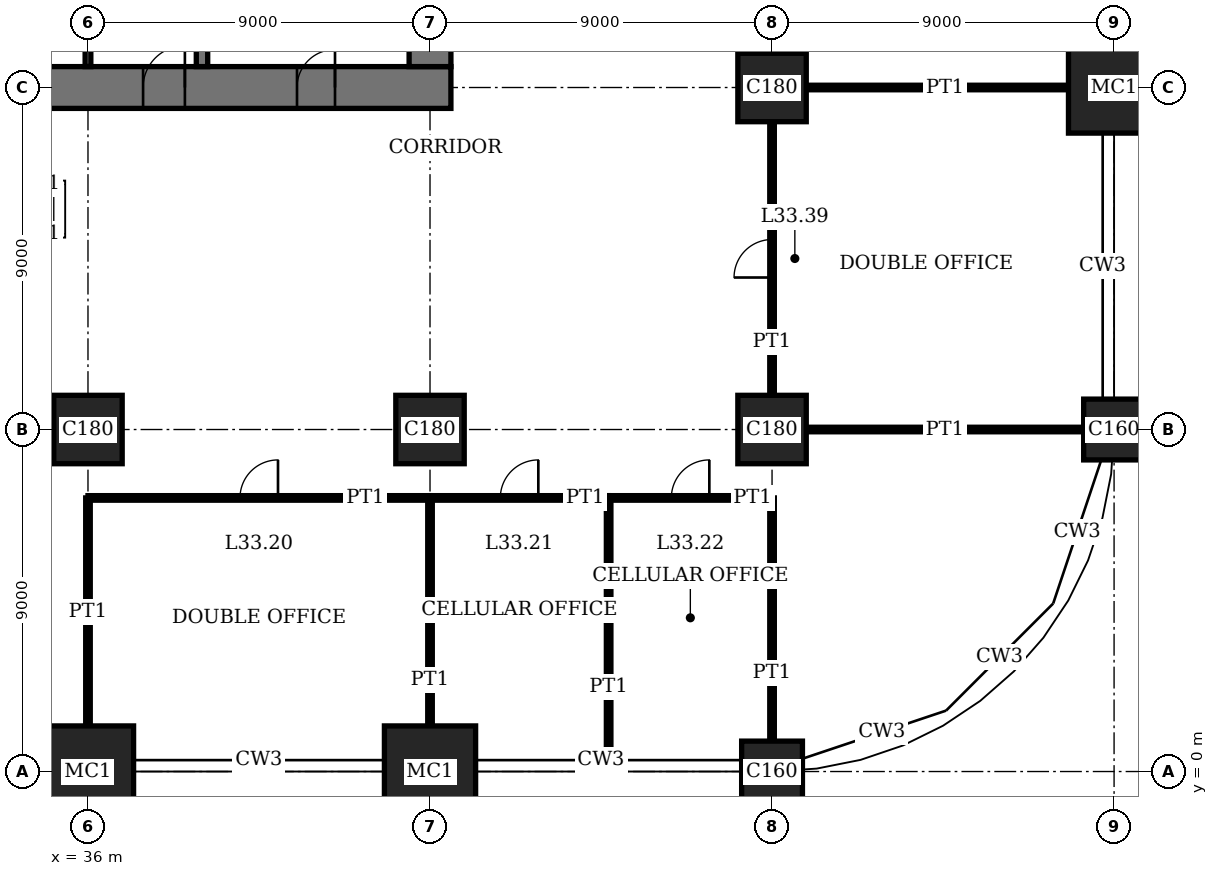
"""IFC4 building model, lengths in metres.
Left out: names, types, materials, properties, quantities, classifications, styles, units other than length and angle.
Written with IfcOpenShell. Run it as: python <this file> out.ifc"""

import sys

from ifc_helpers import new_model, si_unit, direction, frame, frame_2d, origin, origin_2d, place, context, subcontext, project, spatial, rectangle, extrude, element, fill, save


model = new_model("IFC4")
c1 = context("Model", 3, precision=1e-05, world=origin(), true_north=direction((0.0, 1.0)))
c2 = subcontext(c1, "Body", "Model", "MODEL_VIEW")
j1 = project(units=[si_unit("LENGTHUNIT", "METRE"), si_unit("PLANEANGLEUNIT", "RADIAN")], contexts=[c1])
p1 = place(None, origin())
s1 = spatial("IfcSite", under=j1, at=p1, CompositionType="ELEMENT")
p2 = place(p1, origin())
s2 = spatial("IfcBuilding", under=s1, at=p2, CompositionType="ELEMENT")
p3 = place(p2, frame((0.0, 0.0, 137.0)))
s3 = spatial("IfcBuildingStorey", under=s2, at=p3, CompositionType="ELEMENT", Elevation=137.0)
p4 = place(p3, frame((36.0, 0.0, 0.0), z_axis=(0.0, 0.0, 1.0), x_axis=(1.0, 0.0, 0.0)))
e1 = element("IfcColumn", 1, at=p4, inside=s3, PredefinedType="COLUMN", context=c2, shape_type="SweptSolid", body=[
    extrude(rectangle(XDim=2.4, YDim=2.4, at=origin_2d()), origin(), (0.0, 0.0, 1.0), 4.0),
])
p5 = place(p3, frame((36.0, 9.0, 0.0), z_axis=(0.0, 0.0, 1.0), x_axis=(1.0, 0.0, 0.0)))
e2 = element("IfcColumn", 2, at=p5, inside=s3, PredefinedType="COLUMN", context=c2, shape_type="SweptSolid", body=[
    extrude(rectangle(XDim=1.8, YDim=1.8, at=origin_2d()), origin(), (0.0, 0.0, 1.0), 4.0),
])
p6 = place(p3, frame((45.0, 0.0, 0.0), z_axis=(0.0, 0.0, 1.0), x_axis=(1.0, 0.0, 0.0)))
e3 = element("IfcColumn", 3, at=p6, inside=s3, PredefinedType="COLUMN", context=c2, shape_type="SweptSolid", body=[
    extrude(rectangle(XDim=2.4, YDim=2.4, at=origin_2d()), origin(), (0.0, 0.0, 1.0), 4.0),
])
p7 = place(p3, frame((45.0, 9.0, 0.0), z_axis=(0.0, 0.0, 1.0), x_axis=(1.0, 0.0, 0.0)))
e4 = element("IfcColumn", 4, at=p7, inside=s3, PredefinedType="COLUMN", context=c2, shape_type="SweptSolid", body=[
    extrude(rectangle(XDim=1.8, YDim=1.8, at=origin_2d()), origin(), (0.0, 0.0, 1.0), 4.0),
])
p8 = place(p3, frame((54.0, 0.0, 0.0), z_axis=(0.0, 0.0, 1.0), x_axis=(1.0, 0.0, 0.0)))
e5 = element("IfcColumn", 5, at=p8, inside=s3, PredefinedType="COLUMN", context=c2, shape_type="SweptSolid", body=[
    extrude(rectangle(XDim=1.6, YDim=1.6, at=origin_2d()), origin(), (0.0, 0.0, 1.0), 4.0),
])
for number, where, z_axis, x_axis in (
    (6, (54.0, 9.0, 0.0), (0.0, 0.0, 1.0), (1.0, 0.0, 0.0)),
    (7, (54.0, 18.0, 0.0), (0.0, 0.0, 1.0), (1.0, 0.0, 0.0)),
):
    element("IfcColumn", number, at=place(p3, frame(where, z_axis=z_axis, x_axis=x_axis)), inside=s3, PredefinedType="COLUMN", context=c2, shape_type="SweptSolid", body=[
        extrude(rectangle(XDim=1.8, YDim=1.8, at=origin_2d()), origin(), (0.0, 0.0, 1.0), 4.0),
    ])
p9 = place(p3, frame((63.0, 9.0, 0.0), z_axis=(0.0, 0.0, 1.0), x_axis=(1.0, 0.0, 0.0)))
e8 = element("IfcColumn", 8, at=p9, inside=s3, PredefinedType="COLUMN", context=c2, shape_type="SweptSolid", body=[
    extrude(rectangle(XDim=1.6, YDim=1.6, at=origin_2d()), origin(), (0.0, 0.0, 1.0), 4.0),
])
p10 = place(p3, frame((63.0, 18.0, 0.0), z_axis=(0.0, 0.0, 1.0), x_axis=(1.0, 0.0, 0.0)))
e9 = element("IfcColumn", 9, at=p10, inside=s3, PredefinedType="COLUMN", context=c2, shape_type="SweptSolid", body=[
    extrude(rectangle(XDim=2.4, YDim=2.4, at=origin_2d()), origin(), (0.0, 0.0, 1.0), 4.0),
])
p11 = place(p3, frame((17.45, 18.0, 0.0), z_axis=(0.0, 0.0, 1.0), x_axis=(1.0, 0.0, 0.0)))
e10 = element("IfcWall", 10, at=p11, inside=s3, PredefinedType="SHEAR", context=c2, shape_type="SweptSolid", body=[
    extrude(rectangle(XDim=28.1, YDim=1.1, at=frame_2d((14.05, 0.0))), origin(), (0.0, 0.0, 1.0), 4.0),
])
p12 = place(p11, frame((11.55, 0.0, 0.0)))
e11 = element("IfcOpeningElement", 11, at=p12, cuts=e10, PredefinedType="OPENING", context=c2, shape_type="SweptSolid", body=[
    extrude(rectangle(XDim=1.0, YDim=2.4, at=frame_2d((0.5, 1.2))), frame((0.0, 0.56, 0.0), z_axis=(0.0, -1.0, 0.0), x_axis=(1.0, 0.0, 0.0)), (0.0, 0.0, 1.0), 1.12),
])
p13 = place(p11, frame((16.55, 0.0, 0.0)))
e12 = element("IfcOpeningElement", 12, at=p13, cuts=e10, PredefinedType="OPENING", context=c2, shape_type="SweptSolid", body=[
    extrude(rectangle(XDim=1.0, YDim=2.4, at=frame_2d((0.5, 1.2))), frame((0.0, 0.56, 0.0), z_axis=(0.0, -1.0, 0.0), x_axis=(1.0, 0.0, 0.0)), (0.0, 0.0, 1.0), 1.12),
])
p14 = place(p11, frame((20.0, 0.0, 0.0)))
e13 = element("IfcOpeningElement", 13, at=p14, cuts=e10, PredefinedType="OPENING", context=c2, shape_type="SweptSolid", body=[
    extrude(rectangle(XDim=1.1, YDim=2.4, at=frame_2d((0.55, 1.2))), frame((0.0, 0.56, 0.0), z_axis=(0.0, -1.0, 0.0), x_axis=(1.0, 0.0, 0.0)), (0.0, 0.0, 1.0), 1.12),
])
p15 = place(p11, frame((24.05, 0.0, 0.0)))
e14 = element("IfcOpeningElement", 14, at=p15, cuts=e10, PredefinedType="OPENING", context=c2, shape_type="SweptSolid", body=[
    extrude(rectangle(XDim=1.0, YDim=2.4, at=frame_2d((0.5, 1.2))), frame((0.0, 0.56, 0.0), z_axis=(0.0, -1.0, 0.0), x_axis=(1.0, 0.0, 0.0)), (0.0, 0.0, 1.0), 1.12),
])
p16 = place(p3, frame((45.0, 18.55, 0.0), z_axis=(0.0, 0.0, 1.0), x_axis=(0.0, 1.0, 0.0)))
e15 = element("IfcWall", 15, at=p16, inside=s3, PredefinedType="SHEAR", context=c2, shape_type="SweptSolid", body=[
    extrude(rectangle(XDim=16.9, YDim=1.1, at=frame_2d((8.45, 0.0))), origin(), (0.0, 0.0, 1.0), 4.0),
])
p17 = place(p16, frame((8.45, 0.0, 0.0)))
e16 = element("IfcOpeningElement", 16, at=p17, cuts=e15, PredefinedType="OPENING", context=c2, shape_type="SweptSolid", body=[
    extrude(rectangle(XDim=1.8, YDim=2.4, at=frame_2d((0.9, 1.2))), frame((0.0, 0.56, 0.0), z_axis=(0.0, -1.0, 0.0), x_axis=(1.0, 0.0, 0.0)), (0.0, 0.0, 1.0), 1.12),
])
p18 = place(p3, frame((39.0, 18.55, 0.0), z_axis=(0.0, 0.0, 1.0), x_axis=(0.0, 1.0, 0.0)))
e17 = element("IfcWall", 17, at=p18, inside=s3, PredefinedType="SHEAR", context=c2, shape_type="SweptSolid", body=[
    extrude(rectangle(XDim=5.9, YDim=0.3, at=frame_2d((2.95, 0.0))), origin(), (0.0, 0.0, 1.0), 4.0),
])
p19 = place(p3, frame((36.0, 7.2, 0.0), z_axis=(0.0, 0.0, 1.0), x_axis=(1.0, 0.0, 0.0)))
e18 = element("IfcWall", 18, at=p19, inside=s3, PredefinedType="PARTITIONING", context=c2, shape_type="SweptSolid", body=[
    extrude(rectangle(XDim=9.0, YDim=0.12, at=frame_2d((4.5, 0.0))), origin(), (0.0, 0.0, 1.0), 3.75),
])
p20 = place(p19, frame((4.0, 0.0, 0.0)))
e19 = element("IfcOpeningElement", 19, at=p20, cuts=e18, PredefinedType="OPENING", context=c2, shape_type="SweptSolid", body=[
    extrude(rectangle(XDim=1.0, YDim=2.4, at=frame_2d((0.5, 1.2))), frame((0.0, 0.07, 0.0), z_axis=(0.0, -1.0, 0.0), x_axis=(1.0, 0.0, 0.0)), (0.0, 0.0, 1.0), 0.14),
])
p21 = place(p3, frame((45.0, 7.2, 0.0), z_axis=(0.0, 0.0, 1.0), x_axis=(1.0, 0.0, 0.0)))
e20 = element("IfcWall", 20, at=p21, inside=s3, PredefinedType="PARTITIONING", context=c2, shape_type="SweptSolid", body=[
    extrude(rectangle(XDim=4.7, YDim=0.12, at=frame_2d((2.35, 0.0))), origin(), (0.0, 0.0, 1.0), 3.75),
])
p22 = place(p21, frame((1.85, 0.0, 0.0)))
e21 = element("IfcOpeningElement", 21, at=p22, cuts=e20, PredefinedType="OPENING", context=c2, shape_type="SweptSolid", body=[
    extrude(rectangle(XDim=1.0, YDim=2.4, at=frame_2d((0.5, 1.2))), frame((0.0, 0.07, 0.0), z_axis=(0.0, -1.0, 0.0), x_axis=(1.0, 0.0, 0.0)), (0.0, 0.0, 1.0), 0.14),
])
p23 = place(p3, frame((49.7, 7.2, 0.0), z_axis=(0.0, 0.0, 1.0), x_axis=(1.0, 0.0, 0.0)))
e22 = element("IfcWall", 22, at=p23, inside=s3, PredefinedType="PARTITIONING", context=c2, shape_type="SweptSolid", body=[
    extrude(rectangle(XDim=4.3, YDim=0.12, at=frame_2d((2.15, 0.0))), origin(), (0.0, 0.0, 1.0), 3.75),
])
p24 = place(p23, frame((1.65, 0.0, 0.0)))
e23 = element("IfcOpeningElement", 23, at=p24, cuts=e22, PredefinedType="OPENING", context=c2, shape_type="SweptSolid", body=[
    extrude(rectangle(XDim=1.0, YDim=2.4, at=frame_2d((0.5, 1.2))), frame((0.0, 0.07, 0.0), z_axis=(0.0, -1.0, 0.0), x_axis=(1.0, 0.0, 0.0)), (0.0, 0.0, 1.0), 0.14),
])
p25 = place(p3, frame((54.9, 9.0, 0.0), z_axis=(0.0, 0.0, 1.0), x_axis=(1.0, 0.0, 0.0)))
e24 = element("IfcWall", 24, at=p25, inside=s3, PredefinedType="PARTITIONING", context=c2, shape_type="SweptSolid", body=[
    extrude(rectangle(XDim=7.3, YDim=0.12, at=frame_2d((3.65, 0.0))), origin(), (0.0, 0.0, 1.0), 3.05),
])
p26 = place(p3, frame((54.9, 18.0, 0.0), z_axis=(0.0, 0.0, 1.0), x_axis=(1.0, 0.0, 0.0)))
e25 = element("IfcWall", 25, at=p26, inside=s3, PredefinedType="PARTITIONING", context=c2, shape_type="SweptSolid", body=[
    extrude(rectangle(XDim=6.9, YDim=0.12, at=frame_2d((3.45, 0.0))), origin(), (0.0, 0.0, 1.0), 3.05),
])
for number, where, z_axis, x_axis in (
    (26, (36.0, 1.2, 0.0), (0.0, 0.0, 1.0), (0.0, 1.0, 0.0)),
    (27, (45.0, 1.2, 0.0), (0.0, 0.0, 1.0), (0.0, 1.0, 0.0)),
):
    element("IfcWall", number, at=place(p3, frame(where, z_axis=z_axis, x_axis=x_axis)), inside=s3, PredefinedType="PARTITIONING", context=c2, shape_type="SweptSolid", body=[
        extrude(rectangle(XDim=6.0, YDim=0.12, at=frame_2d((3.0, 0.0))), origin(), (0.0, 0.0, 1.0), 3.05),
    ])
p27 = place(p3, frame((49.7, 0.31, 0.0), z_axis=(0.0, 0.0, 1.0), x_axis=(0.0, 1.0, 0.0)))
e28 = element("IfcWall", 28, at=p27, inside=s3, PredefinedType="PARTITIONING", context=c2, shape_type="SweptSolid", body=[
    extrude(rectangle(XDim=6.89, YDim=0.12, at=frame_2d((3.445, 0.0))), origin(), (0.0, 0.0, 1.0), 3.75),
])
p28 = place(p3, frame((54.0, 0.8, 0.0), z_axis=(0.0, 0.0, 1.0), x_axis=(0.0, 1.0, 0.0)))
e29 = element("IfcWall", 29, at=p28, inside=s3, PredefinedType="PARTITIONING", context=c2, shape_type="SweptSolid", body=[
    extrude(rectangle(XDim=6.4, YDim=0.12, at=frame_2d((3.2, 0.0))), origin(), (0.0, 0.0, 1.0), 3.05),
])
p29 = place(p3, frame((54.0, 9.9, 0.0), z_axis=(0.0, 0.0, 1.0), x_axis=(0.0, 1.0, 0.0)))
e30 = element("IfcWall", 30, at=p29, inside=s3, PredefinedType="PARTITIONING", context=c2, shape_type="SweptSolid", body=[
    extrude(rectangle(XDim=7.2, YDim=0.12, at=frame_2d((3.6, 0.0))), origin(), (0.0, 0.0, 1.0), 3.05),
])
p30 = place(p29, frame((3.1, 0.0, 0.0)))
e31 = element("IfcOpeningElement", 31, at=p30, cuts=e30, PredefinedType="OPENING", context=c2, shape_type="SweptSolid", body=[
    extrude(rectangle(XDim=1.0, YDim=2.4, at=frame_2d((0.5, 1.2))), frame((0.0, 0.07, 0.0), z_axis=(0.0, -1.0, 0.0), x_axis=(1.0, 0.0, 0.0)), (0.0, 0.0, 1.0), 0.14),
])
p31 = place(p3, frame((36.0, 18.55, 0.0), z_axis=(0.0, 0.0, 1.0), x_axis=(0.0, 1.0, 0.0)))
e32 = element("IfcWall", 32, at=p31, inside=s3, PredefinedType="PARTITIONING", context=c2, shape_type="SweptSolid", body=[
    extrude(rectangle(XDim=2.9, YDim=0.15, at=frame_2d((1.45, 0.0))), origin(), (0.0, 0.0, 1.0), 3.75),
])
p32 = place(p14, origin())
e33 = element("IfcDoor", 33, at=p32, inside=s3, OperationType="SINGLE_SWING_LEFT", PredefinedType="DOOR", context=c2, shape_type="SweptSolid", body=[
    extrude(rectangle(XDim=1.1, YDim=2.4, at=frame_2d((0.55, 1.2))), frame((0.0, 0.025, 0.0), z_axis=(0.0, -1.0, 0.0), x_axis=(1.0, 0.0, 0.0)), (0.0, 0.0, 1.0), 0.05),
    extrude(rectangle(XDim=0.04, YDim=2.4, at=frame_2d((0.02, 1.2))), frame((0.0, 0.44, 0.0), z_axis=(0.0, -1.0, 0.0), x_axis=(1.0, 0.0, 0.0)), (0.0, 0.0, 1.0), 0.88),
    extrude(rectangle(XDim=0.04, YDim=2.4, at=frame_2d((1.08, 1.2))), frame((0.0, 0.44, 0.0), z_axis=(0.0, -1.0, 0.0), x_axis=(1.0, 0.0, 0.0)), (0.0, 0.0, 1.0), 0.88),
    extrude(rectangle(XDim=1.1, YDim=0.04, at=frame_2d((0.55, 2.38))), frame((0.0, 0.44, 0.0), z_axis=(0.0, -1.0, 0.0), x_axis=(1.0, 0.0, 0.0)), (0.0, 0.0, 1.0), 0.88),
])
fill(e13, e33)
p33 = place(p15, origin())
e34 = element("IfcDoor", 34, at=p33, inside=s3, OperationType="SINGLE_SWING_LEFT", PredefinedType="DOOR", context=c2, shape_type="SweptSolid", body=[
    extrude(rectangle(XDim=1.0, YDim=2.4, at=frame_2d((0.5, 1.2))), frame((0.0, 0.025, 0.0), z_axis=(0.0, -1.0, 0.0), x_axis=(1.0, 0.0, 0.0)), (0.0, 0.0, 1.0), 0.05),
    extrude(rectangle(XDim=0.04, YDim=2.4, at=frame_2d((0.02, 1.2))), frame((0.0, 0.4, 0.0), z_axis=(0.0, -1.0, 0.0), x_axis=(1.0, 0.0, 0.0)), (0.0, 0.0, 1.0), 0.8),
    extrude(rectangle(XDim=0.04, YDim=2.4, at=frame_2d((0.98, 1.2))), frame((0.0, 0.4, 0.0), z_axis=(0.0, -1.0, 0.0), x_axis=(1.0, 0.0, 0.0)), (0.0, 0.0, 1.0), 0.8),
    extrude(rectangle(XDim=1.0, YDim=0.04, at=frame_2d((0.5, 2.38))), frame((0.0, 0.4, 0.0), z_axis=(0.0, -1.0, 0.0), x_axis=(1.0, 0.0, 0.0)), (0.0, 0.0, 1.0), 0.8),
])
fill(e14, e34)
p34 = place(p20, origin())
e35 = element("IfcDoor", 35, at=p34, inside=s3, OperationType="SINGLE_SWING_LEFT", PredefinedType="DOOR", context=c2, shape_type="SweptSolid", body=[
    extrude(rectangle(XDim=1.0, YDim=2.4, at=frame_2d((0.5, 1.2))), frame((0.0, 0.025, 0.0), z_axis=(0.0, -1.0, 0.0), x_axis=(1.0, 0.0, 0.0)), (0.0, 0.0, 1.0), 0.05),
])
fill(e19, e35)
p35 = place(p22, origin())
e36 = element("IfcDoor", 36, at=p35, inside=s3, OperationType="SINGLE_SWING_LEFT", PredefinedType="DOOR", context=c2, shape_type="SweptSolid", body=[
    extrude(rectangle(XDim=1.0, YDim=2.4, at=frame_2d((0.5, 1.2))), frame((0.0, 0.025, 0.0), z_axis=(0.0, -1.0, 0.0), x_axis=(1.0, 0.0, 0.0)), (0.0, 0.0, 1.0), 0.05),
])
fill(e21, e36)
p36 = place(p24, origin())
e37 = element("IfcDoor", 37, at=p36, inside=s3, OperationType="SINGLE_SWING_LEFT", PredefinedType="DOOR", context=c2, shape_type="SweptSolid", body=[
    extrude(rectangle(XDim=1.0, YDim=2.4, at=frame_2d((0.5, 1.2))), frame((0.0, 0.025, 0.0), z_axis=(0.0, -1.0, 0.0), x_axis=(1.0, 0.0, 0.0)), (0.0, 0.0, 1.0), 0.05),
])
fill(e23, e37)
p37 = place(p30, origin())
e38 = element("IfcDoor", 38, at=p37, inside=s3, OperationType="SINGLE_SWING_RIGHT", PredefinedType="DOOR", context=c2, shape_type="SweptSolid", body=[
    extrude(rectangle(XDim=1.0, YDim=2.4, at=frame_2d((0.5, 1.2))), frame((0.0, 0.025, 0.0), z_axis=(0.0, -1.0, 0.0), x_axis=(1.0, 0.0, 0.0)), (0.0, 0.0, 1.0), 0.05),
])
fill(e31, e38)
save(model, sys.argv[1])
